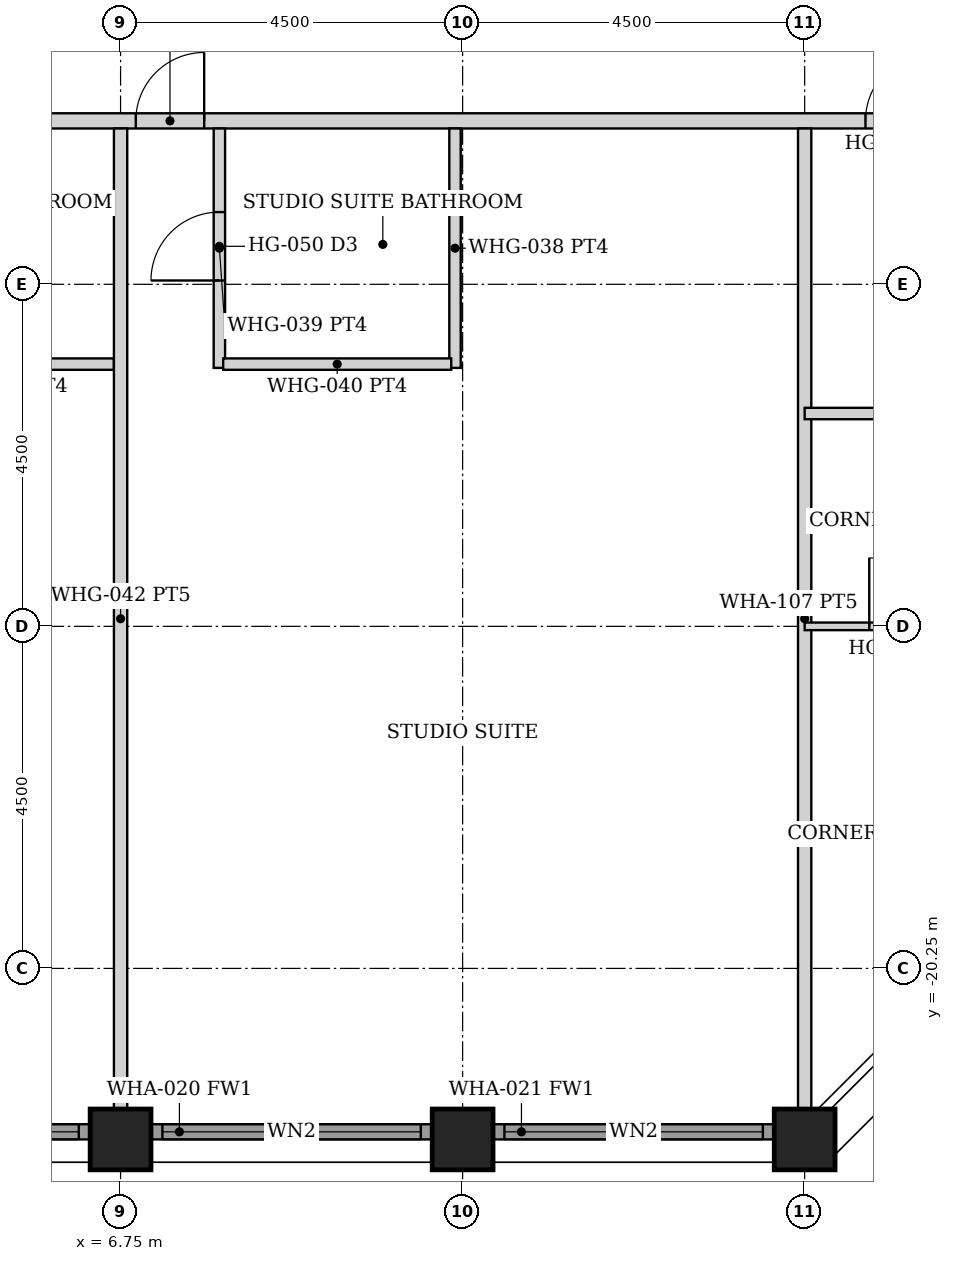
"""IFC4 building model, lengths in metres.
Left out: names, types, materials, properties, quantities, classifications, styles, units other than length and angle.
Written with IfcOpenShell. Run it as: python <this file> out.ifc"""

import sys

from ifc_helpers import new_model, si_unit, direction, frame, frame_2d, origin, origin_2d, place, context, subcontext, project, spatial, rectangle, hollow_rectangle, extrude, element, fill, save


model = new_model("IFC4")
c1 = context("Model", 3, precision=1e-05, world=origin(), true_north=direction((0.0, 1.0)))
c2 = subcontext(c1, "Body", "Model", "MODEL_VIEW")
j1 = project(units=[si_unit("LENGTHUNIT", "METRE"), si_unit("PLANEANGLEUNIT", "RADIAN")], contexts=[c1])
p1 = place(None, origin())
s1 = spatial("IfcSite", under=j1, at=p1, CompositionType="ELEMENT")
p2 = place(p1, origin())
s2 = spatial("IfcBuilding", under=s1, at=p2, CompositionType="ELEMENT")
p3 = place(p2, frame((0.0, 0.0, 183.2)))
s3 = spatial("IfcBuildingStorey", under=s2, at=p3, CompositionType="ELEMENT", Elevation=183.2)
for number, where, z_axis, x_axis in (
    (1, (6.75, -22.5, 0.0), (0.0, 0.0, 1.0), (0.0, 1.0, 0.0)),
    (2, (11.25, -22.5, 0.0), (0.0, 0.0, 1.0), (0.0, 1.0, 0.0)),
    (3, (15.75, -22.5, 0.0), (0.0, 0.0, 1.0), (0.0, 1.0, 0.0)),
):
    element("IfcColumn", number, at=place(p3, frame(where, z_axis=z_axis, x_axis=x_axis)), inside=s3, PredefinedType="COLUMN", context=c2, shape_type="SweptSolid", body=[
        extrude(hollow_rectangle(XDim=0.8, YDim=0.8, WallThickness=0.045, at=origin_2d()), origin(), (0.0, 0.0, 1.0), 3.6),
    ])
p4 = place(p3, frame((2.655, -22.4, 0.0), z_axis=(0.0, 0.0, 1.0), x_axis=(1.0, 0.0, 0.0)))
e4 = element("IfcWall", 4, at=p4, inside=s3, PredefinedType="SOLIDWALL", context=c2, shape_type="SweptSolid", body=[
    extrude(rectangle(XDim=3.69, YDim=0.2, at=frame_2d((1.845, 0.0))), origin(), (0.0, 0.0, 1.0), 2.479),
])
p5 = place(p4, frame((0.145, 0.0, 0.3)))
e5 = element("IfcOpeningElement", 5, at=p5, cuts=e4, PredefinedType="OPENING", context=c2, shape_type="SweptSolid", body=[
    extrude(rectangle(XDim=3.4, YDim=2.029, at=frame_2d((1.7, 1.015))), frame((0.0, 0.11, 0.0), z_axis=(0.0, -1.0, 0.0), x_axis=(1.0, 0.0, 0.0)), (0.0, 0.0, 1.0), 0.22),
])
p6 = place(p3, frame((7.155, -22.4, 0.0), z_axis=(0.0, 0.0, 1.0), x_axis=(1.0, 0.0, 0.0)))
e6 = element("IfcWall", 6, at=p6, inside=s3, PredefinedType="SOLIDWALL", context=c2, shape_type="SweptSolid", body=[
    extrude(rectangle(XDim=3.69, YDim=0.2, at=frame_2d((1.845, 0.0))), origin(), (0.0, 0.0, 1.0), 2.479),
])
p7 = place(p6, frame((0.145, 0.0, 0.3)))
e7 = element("IfcOpeningElement", 7, at=p7, cuts=e6, PredefinedType="OPENING", context=c2, shape_type="SweptSolid", body=[
    extrude(rectangle(XDim=3.4, YDim=2.029, at=frame_2d((1.7, 1.015))), frame((0.0, 0.11, 0.0), z_axis=(0.0, -1.0, 0.0), x_axis=(1.0, 0.0, 0.0)), (0.0, 0.0, 1.0), 0.22),
])
p8 = place(p3, frame((11.655, -22.4, 0.0), z_axis=(0.0, 0.0, 1.0), x_axis=(1.0, 0.0, 0.0)))
e8 = element("IfcWall", 8, at=p8, inside=s3, PredefinedType="SOLIDWALL", context=c2, shape_type="SweptSolid", body=[
    extrude(rectangle(XDim=3.69, YDim=0.2, at=frame_2d((1.845, 0.0))), origin(), (0.0, 0.0, 1.0), 2.479),
])
p9 = place(p8, frame((0.145, 0.0, 0.3)))
e9 = element("IfcOpeningElement", 9, at=p9, cuts=e8, PredefinedType="OPENING", context=c2, shape_type="SweptSolid", body=[
    extrude(rectangle(XDim=3.4, YDim=2.029, at=frame_2d((1.7, 1.015))), frame((0.0, 0.11, 0.0), z_axis=(0.0, -1.0, 0.0), x_axis=(1.0, 0.0, 0.0)), (0.0, 0.0, 1.0), 0.22),
])
p10 = place(p3, frame((-22.3, -9.1, 0.0), z_axis=(0.0, 0.0, 1.0), x_axis=(1.0, 0.0, 0.0)))
e10 = element("IfcWall", 10, at=p10, inside=s3, PredefinedType="PARTITIONING", context=c2, shape_type="SweptSolid", body=[
    extrude(rectangle(XDim=44.6, YDim=0.2, at=frame_2d((22.3, 0.0))), origin(), (0.0, 0.0, 1.0), 2.473),
])
p11 = place(p10, frame((11.35, 0.0, 0.0)))
e11 = element("IfcOpeningElement", 11, at=p11, cuts=e10, PredefinedType="OPENING", context=c2, shape_type="SweptSolid", body=[
    extrude(rectangle(XDim=0.9, YDim=2.1, at=frame_2d((0.45, 1.05))), frame((0.0, 0.11, 0.0), z_axis=(0.0, -1.0, 0.0), x_axis=(1.0, 0.0, 0.0)), (0.0, 0.0, 1.0), 0.22),
])
p12 = place(p10, frame((15.75, 0.0, 0.0)))
e12 = element("IfcOpeningElement", 12, at=p12, cuts=e10, PredefinedType="OPENING", context=c2, shape_type="SweptSolid", body=[
    extrude(rectangle(XDim=0.9, YDim=2.1, at=frame_2d((0.45, 1.05))), frame((0.0, 0.11, 0.0), z_axis=(0.0, -1.0, 0.0), x_axis=(1.0, 0.0, 0.0)), (0.0, 0.0, 1.0), 0.22),
])
p13 = place(p10, frame((23.45, 0.0, 0.0)))
e13 = element("IfcOpeningElement", 13, at=p13, cuts=e10, PredefinedType="OPENING", context=c2, shape_type="SweptSolid", body=[
    extrude(rectangle(XDim=0.9, YDim=2.1, at=frame_2d((0.45, 1.05))), frame((0.0, 0.11, 0.0), z_axis=(0.0, -1.0, 0.0), x_axis=(1.0, 0.0, 0.0)), (0.0, 0.0, 1.0), 0.22),
])
p14 = place(p10, frame((24.75, 0.0, 0.0)))
e14 = element("IfcOpeningElement", 14, at=p14, cuts=e10, PredefinedType="OPENING", context=c2, shape_type="SweptSolid", body=[
    extrude(rectangle(XDim=0.9, YDim=2.1, at=frame_2d((0.45, 1.05))), frame((0.0, 0.11, 0.0), z_axis=(0.0, -1.0, 0.0), x_axis=(1.0, 0.0, 0.0)), (0.0, 0.0, 1.0), 0.22),
])
p15 = place(p10, frame((29.25, 0.0, 0.0)))
e15 = element("IfcOpeningElement", 15, at=p15, cuts=e10, PredefinedType="OPENING", context=c2, shape_type="SweptSolid", body=[
    extrude(rectangle(XDim=0.9, YDim=2.1, at=frame_2d((0.45, 1.05))), frame((0.0, 0.11, 0.0), z_axis=(0.0, -1.0, 0.0), x_axis=(1.0, 0.0, 0.0)), (0.0, 0.0, 1.0), 0.22),
])
p16 = place(p10, frame((38.85, 0.0, 0.0)))
e16 = element("IfcOpeningElement", 16, at=p16, cuts=e10, PredefinedType="OPENING", context=c2, shape_type="SweptSolid", body=[
    extrude(rectangle(XDim=0.9, YDim=2.1, at=frame_2d((0.45, 1.05))), frame((0.0, 0.11, 0.0), z_axis=(0.0, -1.0, 0.0), x_axis=(1.0, 0.0, 0.0)), (0.0, 0.0, 1.0), 0.22),
])
p17 = place(p10, frame((4.85, 0.0, 0.0)))
e17 = element("IfcOpeningElement", 17, at=p17, cuts=e10, PredefinedType="OPENING", context=c2, shape_type="SweptSolid", body=[
    extrude(rectangle(XDim=0.9, YDim=2.1, at=frame_2d((0.45, 1.05))), frame((0.0, 0.11, 0.0), z_axis=(0.0, -1.0, 0.0), x_axis=(1.0, 0.0, 0.0)), (0.0, 0.0, 1.0), 0.22),
])
p18 = place(p3, frame((3.6, -12.3, 0.0), z_axis=(0.0, 0.0, 1.0), x_axis=(1.0, 0.0, 0.0)))
e18 = element("IfcWall", 18, at=p18, inside=s3, PredefinedType="PARTITIONING", context=c2, shape_type="SweptSolid", body=[
    extrude(rectangle(XDim=3.062, YDim=0.15, at=frame_2d((1.531, 0.0))), origin(), (0.0, 0.0, 1.0), 2.473),
])
p19 = place(p3, frame((8.05, -12.35, 0.0), z_axis=(0.0, 0.0, 1.0), x_axis=(0.0, 1.0, 0.0)))
e19 = element("IfcWall", 19, at=p19, inside=s3, PredefinedType="PARTITIONING", context=c2, shape_type="SweptSolid", body=[
    extrude(rectangle(XDim=3.15, YDim=0.15, at=frame_2d((1.575, 0.0))), origin(), (0.0, 0.0, 1.0), 2.473),
])
p20 = place(p19, frame((1.15, 0.0, 0.0)))
e20 = element("IfcOpeningElement", 20, at=p20, cuts=e19, PredefinedType="OPENING", context=c2, shape_type="SweptSolid", body=[
    extrude(rectangle(XDim=0.9, YDim=2.1, at=frame_2d((0.45, 1.05))), frame((0.0, 0.085, 0.0), z_axis=(0.0, -1.0, 0.0), x_axis=(1.0, 0.0, 0.0)), (0.0, 0.0, 1.0), 0.17),
])
p21 = place(p3, frame((11.15, -12.35, 0.0), z_axis=(0.0, 0.0, 1.0), x_axis=(0.0, 1.0, 0.0)))
e21 = element("IfcWall", 21, at=p21, inside=s3, PredefinedType="PARTITIONING", context=c2, shape_type="SweptSolid", body=[
    extrude(rectangle(XDim=3.15, YDim=0.15, at=frame_2d((1.575, 0.0))), origin(), (0.0, 0.0, 1.0), 2.473),
])
p22 = place(p3, frame((8.1, -12.3, 0.0), z_axis=(0.0, 0.0, 1.0), x_axis=(1.0, 0.0, 0.0)))
e22 = element("IfcWall", 22, at=p22, inside=s3, PredefinedType="PARTITIONING", context=c2, shape_type="SweptSolid", body=[
    extrude(rectangle(XDim=3.0, YDim=0.15, at=frame_2d((1.5, 0.0))), origin(), (0.0, 0.0, 1.0), 2.473),
])
for number, where, z_axis, x_axis in (
    (23, (6.75, -22.1, 0.0), (0.0, 0.0, 1.0), (0.0, 1.0, 0.0)),
    (24, (15.75, -22.1, 0.0), (0.0, 0.0, 1.0), (0.0, 1.0, 0.0)),
):
    element("IfcWall", number, at=place(p3, frame(where, z_axis=z_axis, x_axis=x_axis)), inside=s3, PredefinedType="PARTITIONING", context=c2, shape_type="SweptSolid", body=[
        extrude(rectangle(XDim=12.9, YDim=0.175, at=frame_2d((6.45, 0.0))), origin(), (0.0, 0.0, 1.0), 2.473),
    ])
p23 = place(p3, frame((15.75, -15.75, 0.0), z_axis=(0.0, 0.0, 1.0), x_axis=(1.0, 0.0, 0.0)))
e25 = element("IfcWall", 25, at=p23, inside=s3, PredefinedType="PARTITIONING", context=c2, shape_type="SweptSolid", body=[
    extrude(rectangle(XDim=6.35, YDim=0.1, at=frame_2d((3.175, 0.0))), origin(), (0.0, 0.0, 1.0), 2.473),
])
p24 = place(p23, frame((4.125, 0.0, 0.0)))
e26 = element("IfcOpeningElement", 26, at=p24, cuts=e25, PredefinedType="OPENING", context=c2, shape_type="SweptSolid", body=[
    extrude(rectangle(XDim=0.85, YDim=2.1, at=frame_2d((0.425, 1.05))), frame((0.0, 0.06, 0.0), z_axis=(0.0, -1.0, 0.0), x_axis=(1.0, 0.0, 0.0)), (0.0, 0.0, 1.0), 0.12),
])
p25 = place(p23, frame((0.85, 0.0, 0.0)))
e27 = element("IfcOpeningElement", 27, at=p25, cuts=e25, PredefinedType="OPENING", context=c2, shape_type="SweptSolid", body=[
    extrude(rectangle(XDim=0.9, YDim=2.1, at=frame_2d((0.45, 1.05))), frame((0.0, 0.06, 0.0), z_axis=(0.0, -1.0, 0.0), x_axis=(1.0, 0.0, 0.0)), (0.0, 0.0, 1.0), 0.12),
])
p26 = place(p3, frame((15.75, -12.95, 0.0), z_axis=(0.0, 0.0, 1.0), x_axis=(1.0, 0.0, 0.0)))
e28 = element("IfcWall", 28, at=p26, inside=s3, PredefinedType="PARTITIONING", context=c2, shape_type="SweptSolid", body=[
    extrude(rectangle(XDim=2.8, YDim=0.15, at=frame_2d((1.4, 0.0))), origin(), (0.0, 0.0, 1.0), 2.473),
])
p27 = place(p5, origin())
e29 = element("IfcWindow", 29, at=p27, inside=s3, PartitioningType="SINGLE_PANEL", PredefinedType="WINDOW", context=c2, shape_type="SweptSolid", body=[
    extrude(rectangle(XDim=3.4, YDim=2.029, at=frame_2d((1.7, 1.015))), frame((0.0, 0.03, 0.0), z_axis=(0.0, -1.0, 0.0), x_axis=(1.0, 0.0, 0.0)), (0.0, 0.0, 1.0), 0.06),
])
fill(e5, e29)
p28 = place(p7, origin())
e30 = element("IfcWindow", 30, at=p28, inside=s3, PartitioningType="SINGLE_PANEL", PredefinedType="WINDOW", context=c2, shape_type="SweptSolid", body=[
    extrude(rectangle(XDim=3.4, YDim=2.029, at=frame_2d((1.7, 1.015))), frame((0.0, 0.03, 0.0), z_axis=(0.0, -1.0, 0.0), x_axis=(1.0, 0.0, 0.0)), (0.0, 0.0, 1.0), 0.06),
])
fill(e7, e30)
p29 = place(p9, origin())
e31 = element("IfcWindow", 31, at=p29, inside=s3, PartitioningType="SINGLE_PANEL", PredefinedType="WINDOW", context=c2, shape_type="SweptSolid", body=[
    extrude(rectangle(XDim=3.4, YDim=2.029, at=frame_2d((1.7, 1.015))), frame((0.0, 0.03, 0.0), z_axis=(0.0, -1.0, 0.0), x_axis=(1.0, 0.0, 0.0)), (0.0, 0.0, 1.0), 0.06),
])
fill(e9, e31)
p30 = place(p15, origin())
e32 = element("IfcDoor", 32, at=p30, inside=s3, OperationType="SINGLE_SWING_RIGHT", PredefinedType="DOOR", context=c2, shape_type="SweptSolid", body=[
    extrude(rectangle(XDim=0.9, YDim=2.1, at=frame_2d((0.45, 1.05))), frame((0.0, 0.025, 0.0), z_axis=(0.0, -1.0, 0.0), x_axis=(1.0, 0.0, 0.0)), (0.0, 0.0, 1.0), 0.05),
])
fill(e15, e32)
p31 = place(p20, origin())
e33 = element("IfcDoor", 33, at=p31, inside=s3, OperationType="SINGLE_SWING_LEFT", PredefinedType="DOOR", context=c2, shape_type="SweptSolid", body=[
    extrude(rectangle(XDim=0.9, YDim=2.1, at=frame_2d((0.45, 1.05))), frame((0.0, 0.025, 0.0), z_axis=(0.0, -1.0, 0.0), x_axis=(1.0, 0.0, 0.0)), (0.0, 0.0, 1.0), 0.05),
])
fill(e20, e33)
p32 = place(p16, origin())
e34 = element("IfcDoor", 34, at=p32, inside=s3, OperationType="SINGLE_SWING_RIGHT", PredefinedType="DOOR", context=c2, shape_type="SweptSolid", body=[
    extrude(rectangle(XDim=0.9, YDim=2.1, at=frame_2d((0.45, 1.05))), frame((0.0, 0.025, 0.0), z_axis=(0.0, -1.0, 0.0), x_axis=(1.0, 0.0, 0.0)), (0.0, 0.0, 1.0), 0.05),
])
fill(e16, e34)
p33 = place(p25, origin())
e35 = element("IfcDoor", 35, at=p33, inside=s3, OperationType="SINGLE_SWING_LEFT", PredefinedType="DOOR", context=c2, shape_type="SweptSolid", body=[
    extrude(rectangle(XDim=0.9, YDim=2.1, at=frame_2d((0.45, 1.05))), frame((0.0, 0.025, 0.0), z_axis=(0.0, -1.0, 0.0), x_axis=(1.0, 0.0, 0.0)), (0.0, 0.0, 1.0), 0.05),
])
fill(e27, e35)
save(model, sys.argv[1])
